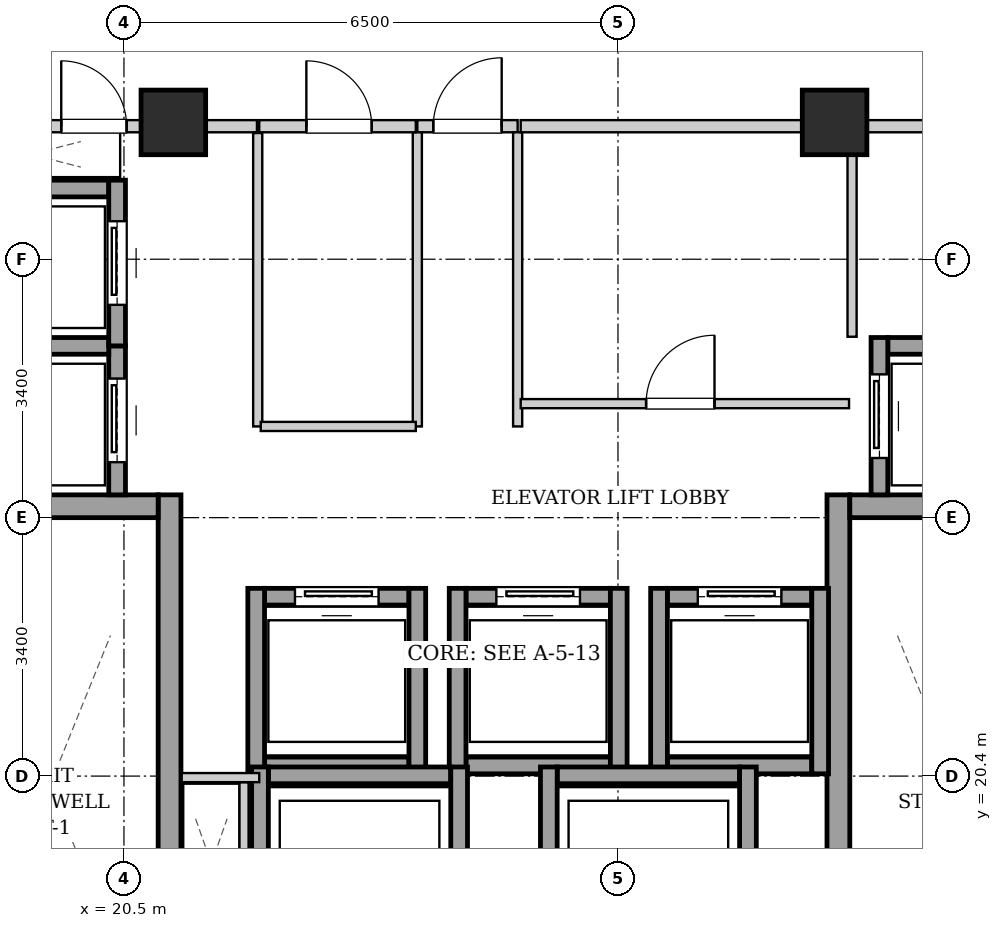
"""IFC4 building model, lengths in metres.
Left out: names, types, materials, properties, quantities, classifications, styles, units other than length and angle.
Written with IfcOpenShell. Run it as: python <this file> out.ifc"""

import sys

from ifc_helpers import new_model, si_unit, direction, frame, frame_2d, origin, origin_2d, place, context, subcontext, project, spatial, rectangle, extrude, element, fill, save


model = new_model("IFC4")
c1 = context("Model", 3, precision=1e-05, world=origin(), true_north=direction((0.0, 1.0)))
c2 = subcontext(c1, "Body", "Model", "MODEL_VIEW")
j1 = project(units=[si_unit("LENGTHUNIT", "METRE"), si_unit("PLANEANGLEUNIT", "RADIAN")], contexts=[c1])
p1 = place(None, origin())
s1 = spatial("IfcSite", under=j1, at=p1, CompositionType="ELEMENT")
p2 = place(p1, origin())
s2 = spatial("IfcBuilding", under=s1, at=p2, CompositionType="ELEMENT")
p3 = place(p2, frame((0.0, 0.0, 174.4)))
s3 = spatial("IfcBuildingStorey", under=s2, at=p3, CompositionType="ELEMENT", Elevation=174.4)
for number, where, z_axis, x_axis in (
    (1, (21.15, 29.0, 0.0), (0.0, 0.0, 1.0), (1.0, 0.0, 0.0)),
    (2, (29.85, 29.0, 0.0), (0.0, 0.0, 1.0), (1.0, 0.0, 0.0)),
):
    element("IfcColumn", number, at=place(p3, frame(where, z_axis=z_axis, x_axis=x_axis)), inside=s3, PredefinedType="COLUMN", context=c2, shape_type="SweptSolid", body=[
        extrude(rectangle(XDim=0.85, YDim=0.85, at=origin_2d()), origin(), (0.0, 0.0, 1.0), 3.3),
    ])
p4 = place(p3, frame((21.1, 15.1, 0.0), z_axis=(0.0, 0.0, 1.0), x_axis=(0.0, 1.0, 0.0)))
e3 = element("IfcWall", 3, at=p4, inside=s3, PredefinedType="SHEAR", context=c2, shape_type="SweptSolid", body=[
    extrude(rectangle(XDim=9.0, YDim=0.3, at=frame_2d((4.5, 0.0))), origin(), (0.0, 0.0, 1.0), 3.04),
])
p5 = place(p3, frame((18.1, 23.95, 0.0), z_axis=(0.0, 0.0, 1.0), x_axis=(1.0, 0.0, 0.0)))
e4 = element("IfcWall", 4, at=p5, inside=s3, PredefinedType="SHEAR", context=c2, shape_type="SweptSolid", body=[
    extrude(rectangle(XDim=2.85, YDim=0.3, at=frame_2d((1.425, 0.0))), origin(), (0.0, 0.0, 1.0), 3.04),
])
p6 = place(p3, frame((29.9, 15.1, 0.0), z_axis=(0.0, 0.0, 1.0), x_axis=(0.0, 1.0, 0.0)))
e5 = element("IfcWall", 5, at=p6, inside=s3, PredefinedType="SHEAR", context=c2, shape_type="SweptSolid", body=[
    extrude(rectangle(XDim=9.0, YDim=0.3, at=frame_2d((4.5, 0.0))), origin(), (0.0, 0.0, 1.0), 3.04),
])
p7 = place(p3, frame((30.05, 23.95, 0.0), z_axis=(0.0, 0.0, 1.0), x_axis=(1.0, 0.0, 0.0)))
e6 = element("IfcWall", 6, at=p7, inside=s3, PredefinedType="SHEAR", context=c2, shape_type="SweptSolid", body=[
    extrude(rectangle(XDim=2.85, YDim=0.3, at=frame_2d((1.425, 0.0))), origin(), (0.0, 0.0, 1.0), 3.04),
])
p8 = place(p3, frame((22.35, 20.54, 0.0), z_axis=(0.0, 0.0, 1.0), x_axis=(1.0, 0.0, 0.0)))
e7 = element("IfcWall", 7, at=p8, inside=s3, PredefinedType="SHEAR", context=c2, shape_type="SweptSolid", body=[
    extrude(rectangle(XDim=1.9, YDim=0.22, at=frame_2d((0.95, 0.0))), origin(), (0.0, 0.0, 1.0), 3.04),
])
p9 = place(p3, frame((22.35, 22.76, 0.0), z_axis=(0.0, 0.0, 1.0), x_axis=(1.0, 0.0, 0.0)))
e8 = element("IfcWall", 8, at=p9, inside=s3, PredefinedType="SHEAR", context=c2, shape_type="SweptSolid", body=[
    extrude(rectangle(XDim=1.9, YDim=0.22, at=frame_2d((0.95, 0.0))), origin(), (0.0, 0.0, 1.0), 3.04),
])
p10 = place(p9, frame((0.4, 0.0, 0.0)))
e9 = element("IfcOpeningElement", 9, at=p10, cuts=e8, PredefinedType="OPENING", context=c2, shape_type="SweptSolid", body=[
    extrude(rectangle(XDim=1.1, YDim=2.15, at=frame_2d((0.55, 1.075))), frame((0.0, 0.12, 0.0), z_axis=(0.0, -1.0, 0.0), x_axis=(1.0, 0.0, 0.0)), (0.0, 0.0, 1.0), 0.24),
])
for number, where, z_axis, x_axis in (
    (10, (22.24, 20.43, 0.0), (0.0, 0.0, 1.0), (0.0, 1.0, 0.0)),
    (11, (24.36, 20.43, 0.0), (0.0, 0.0, 1.0), (0.0, 1.0, 0.0)),
):
    element("IfcWall", number, at=place(p3, frame(where, z_axis=z_axis, x_axis=x_axis)), inside=s3, PredefinedType="SHEAR", context=c2, shape_type="SweptSolid", body=[
        extrude(rectangle(XDim=2.44, YDim=0.22, at=frame_2d((1.22, 0.0))), origin(), (0.0, 0.0, 1.0), 3.04),
    ])
p11 = place(p3, frame((25.0, 20.54, 0.0), z_axis=(0.0, 0.0, 1.0), x_axis=(1.0, 0.0, 0.0)))
e12 = element("IfcWall", 12, at=p11, inside=s3, PredefinedType="SHEAR", context=c2, shape_type="SweptSolid", body=[
    extrude(rectangle(XDim=1.9, YDim=0.22, at=frame_2d((0.95, 0.0))), origin(), (0.0, 0.0, 1.0), 3.04),
])
p12 = place(p3, frame((25.0, 22.76, 0.0), z_axis=(0.0, 0.0, 1.0), x_axis=(1.0, 0.0, 0.0)))
e13 = element("IfcWall", 13, at=p12, inside=s3, PredefinedType="SHEAR", context=c2, shape_type="SweptSolid", body=[
    extrude(rectangle(XDim=1.9, YDim=0.22, at=frame_2d((0.95, 0.0))), origin(), (0.0, 0.0, 1.0), 3.04),
])
p13 = place(p12, frame((0.4, 0.0, 0.0)))
e14 = element("IfcOpeningElement", 14, at=p13, cuts=e13, PredefinedType="OPENING", context=c2, shape_type="SweptSolid", body=[
    extrude(rectangle(XDim=1.1, YDim=2.15, at=frame_2d((0.55, 1.075))), frame((0.0, 0.12, 0.0), z_axis=(0.0, -1.0, 0.0), x_axis=(1.0, 0.0, 0.0)), (0.0, 0.0, 1.0), 0.24),
])
for number, where, z_axis, x_axis in (
    (15, (24.89, 20.43, 0.0), (0.0, 0.0, 1.0), (0.0, 1.0, 0.0)),
    (16, (27.01, 20.43, 0.0), (0.0, 0.0, 1.0), (0.0, 1.0, 0.0)),
):
    element("IfcWall", number, at=place(p3, frame(where, z_axis=z_axis, x_axis=x_axis)), inside=s3, PredefinedType="SHEAR", context=c2, shape_type="SweptSolid", body=[
        extrude(rectangle(XDim=2.44, YDim=0.22, at=frame_2d((1.22, 0.0))), origin(), (0.0, 0.0, 1.0), 3.04),
    ])
p14 = place(p3, frame((27.65, 20.54, 0.0), z_axis=(0.0, 0.0, 1.0), x_axis=(1.0, 0.0, 0.0)))
e17 = element("IfcWall", 17, at=p14, inside=s3, PredefinedType="SHEAR", context=c2, shape_type="SweptSolid", body=[
    extrude(rectangle(XDim=1.9, YDim=0.22, at=frame_2d((0.95, 0.0))), origin(), (0.0, 0.0, 1.0), 3.04),
])
p15 = place(p3, frame((27.65, 22.76, 0.0), z_axis=(0.0, 0.0, 1.0), x_axis=(1.0, 0.0, 0.0)))
e18 = element("IfcWall", 18, at=p15, inside=s3, PredefinedType="SHEAR", context=c2, shape_type="SweptSolid", body=[
    extrude(rectangle(XDim=1.9, YDim=0.22, at=frame_2d((0.95, 0.0))), origin(), (0.0, 0.0, 1.0), 3.04),
])
p16 = place(p15, frame((0.4, 0.0, 0.0)))
e19 = element("IfcOpeningElement", 19, at=p16, cuts=e18, PredefinedType="OPENING", context=c2, shape_type="SweptSolid", body=[
    extrude(rectangle(XDim=1.1, YDim=2.15, at=frame_2d((0.55, 1.075))), frame((0.0, 0.12, 0.0), z_axis=(0.0, -1.0, 0.0), x_axis=(1.0, 0.0, 0.0)), (0.0, 0.0, 1.0), 0.24),
])
for number, where, z_axis, x_axis in (
    (20, (27.54, 20.43, 0.0), (0.0, 0.0, 1.0), (0.0, 1.0, 0.0)),
    (21, (29.66, 20.43, 0.0), (0.0, 0.0, 1.0), (0.0, 1.0, 0.0)),
):
    element("IfcWall", number, at=place(p3, frame(where, z_axis=z_axis, x_axis=x_axis)), inside=s3, PredefinedType="SHEAR", context=c2, shape_type="SweptSolid", body=[
        extrude(rectangle(XDim=2.44, YDim=0.22, at=frame_2d((1.22, 0.0))), origin(), (0.0, 0.0, 1.0), 3.04),
    ])
p17 = place(p3, frame((20.41, 24.1, 0.0), z_axis=(0.0, 0.0, 1.0), x_axis=(0.0, 1.0, 0.0)))
e22 = element("IfcWall", 22, at=p17, inside=s3, PredefinedType="SHEAR", context=c2, shape_type="SweptSolid", body=[
    extrude(rectangle(XDim=1.96, YDim=0.22, at=frame_2d((0.98, 0.0))), origin(), (0.0, 0.0, 1.0), 3.04),
])
p18 = place(p17, frame((0.43, 0.0, 0.0)))
e23 = element("IfcOpeningElement", 23, at=p18, cuts=e22, PredefinedType="OPENING", context=c2, shape_type="SweptSolid", body=[
    extrude(rectangle(XDim=1.1, YDim=2.15, at=frame_2d((0.55, 1.075))), frame((0.0, 0.12, 0.0), z_axis=(0.0, -1.0, 0.0), x_axis=(1.0, 0.0, 0.0)), (0.0, 0.0, 1.0), 0.24),
])
for number, where, z_axis, x_axis in (
    (24, (18.4, 26.06, 0.0), (0.0, 0.0, 1.0), (1.0, 0.0, 0.0)),
    (25, (18.4, 28.13, 0.0), (0.0, 0.0, 1.0), (1.0, 0.0, 0.0)),
):
    element("IfcWall", number, at=place(p3, frame(where, z_axis=z_axis, x_axis=x_axis)), inside=s3, PredefinedType="SHEAR", context=c2, shape_type="SweptSolid", body=[
        extrude(rectangle(XDim=1.9, YDim=0.22, at=frame_2d((0.95, 0.0))), origin(), (0.0, 0.0, 1.0), 3.04),
    ])
p19 = place(p3, frame((20.41, 26.06, 0.0), z_axis=(0.0, 0.0, 1.0), x_axis=(0.0, 1.0, 0.0)))
e26 = element("IfcWall", 26, at=p19, inside=s3, PredefinedType="SHEAR", context=c2, shape_type="SweptSolid", body=[
    extrude(rectangle(XDim=2.18, YDim=0.22, at=frame_2d((1.09, 0.0))), origin(), (0.0, 0.0, 1.0), 3.04),
])
p20 = place(p19, frame((0.54, 0.0, 0.0)))
e27 = element("IfcOpeningElement", 27, at=p20, cuts=e26, PredefinedType="OPENING", context=c2, shape_type="SweptSolid", body=[
    extrude(rectangle(XDim=1.1, YDim=2.15, at=frame_2d((0.55, 1.075))), frame((0.0, 0.12, 0.0), z_axis=(0.0, -1.0, 0.0), x_axis=(1.0, 0.0, 0.0)), (0.0, 0.0, 1.0), 0.24),
])
p21 = place(p3, frame((30.55, 26.06, 0.0), z_axis=(0.0, 0.0, 1.0), x_axis=(1.0, 0.0, 0.0)))
e28 = element("IfcWall", 28, at=p21, inside=s3, PredefinedType="SHEAR", context=c2, shape_type="SweptSolid", body=[
    extrude(rectangle(XDim=1.9, YDim=0.22, at=frame_2d((0.95, 0.0))), origin(), (0.0, 0.0, 1.0), 3.04),
])
p22 = place(p3, frame((30.44, 24.1, 0.0), z_axis=(0.0, 0.0, 1.0), x_axis=(0.0, 1.0, 0.0)))
e29 = element("IfcWall", 29, at=p22, inside=s3, PredefinedType="SHEAR", context=c2, shape_type="SweptSolid", body=[
    extrude(rectangle(XDim=2.07, YDim=0.22, at=frame_2d((1.035, 0.0))), origin(), (0.0, 0.0, 1.0), 3.04),
])
p23 = place(p22, frame((0.485, 0.0, 0.0)))
e30 = element("IfcOpeningElement", 30, at=p23, cuts=e29, PredefinedType="OPENING", context=c2, shape_type="SweptSolid", body=[
    extrude(rectangle(XDim=1.1, YDim=2.15, at=frame_2d((0.55, 1.075))), frame((0.0, 0.12, 0.0), z_axis=(0.0, -1.0, 0.0), x_axis=(1.0, 0.0, 0.0)), (0.0, 0.0, 1.0), 0.24),
])
p24 = place(p3, frame((22.4, 20.41, 0.0), z_axis=(0.0, 0.0, 1.0), x_axis=(1.0, 0.0, 0.0)))
e31 = element("IfcWall", 31, at=p24, inside=s3, PredefinedType="SHEAR", context=c2, shape_type="SweptSolid", body=[
    extrude(rectangle(XDim=2.4, YDim=0.22, at=frame_2d((1.2, 0.0))), origin(), (0.0, 0.0, 1.0), 3.04),
])
for number, where, z_axis, x_axis in (
    (32, (22.29, 17.98, 0.0), (0.0, 0.0, 1.0), (0.0, 1.0, 0.0)),
    (33, (24.91, 17.98, 0.0), (0.0, 0.0, 1.0), (0.0, 1.0, 0.0)),
):
    element("IfcWall", number, at=place(p3, frame(where, z_axis=z_axis, x_axis=x_axis)), inside=s3, PredefinedType="SHEAR", context=c2, shape_type="SweptSolid", body=[
        extrude(rectangle(XDim=2.54, YDim=0.22, at=frame_2d((1.27, 0.0))), origin(), (0.0, 0.0, 1.0), 3.04),
    ])
p25 = place(p3, frame((26.2, 20.41, 0.0), z_axis=(0.0, 0.0, 1.0), x_axis=(1.0, 0.0, 0.0)))
e34 = element("IfcWall", 34, at=p25, inside=s3, PredefinedType="SHEAR", context=c2, shape_type="SweptSolid", body=[
    extrude(rectangle(XDim=2.4, YDim=0.22, at=frame_2d((1.2, 0.0))), origin(), (0.0, 0.0, 1.0), 3.04),
])
for number, where, z_axis, x_axis in (
    (35, (26.09, 17.98, 0.0), (0.0, 0.0, 1.0), (0.0, 1.0, 0.0)),
    (36, (28.71, 17.98, 0.0), (0.0, 0.0, 1.0), (0.0, 1.0, 0.0)),
):
    element("IfcWall", number, at=place(p3, frame(where, z_axis=z_axis, x_axis=x_axis)), inside=s3, PredefinedType="SHEAR", context=c2, shape_type="SweptSolid", body=[
        extrude(rectangle(XDim=2.54, YDim=0.22, at=frame_2d((1.27, 0.0))), origin(), (0.0, 0.0, 1.0), 3.04),
    ])
p26 = place(p3, frame((24.36, 28.95, 0.0), z_axis=(0.0, 0.0, 1.0), x_axis=(1.0, 0.0, 0.0)))
e37 = element("IfcWall", 37, at=p26, inside=s3, PredefinedType="PARTITIONING", context=c2, shape_type="SweptSolid", body=[
    extrude(rectangle(XDim=1.32, YDim=0.16, at=frame_2d((0.66, 0.0))), origin(), (0.0, 0.0, 1.0), 2.556),
])
p27 = place(p26, frame((0.21, 0.0, 0.0)))
e38 = element("IfcOpeningElement", 38, at=p27, cuts=e37, PredefinedType="OPENING", context=c2, shape_type="SweptSolid", body=[
    extrude(rectangle(XDim=0.9, YDim=2.05, at=frame_2d((0.45, 1.025))), frame((0.0, 0.09, 0.0), z_axis=(0.0, -1.0, 0.0), x_axis=(1.0, 0.0, 0.0)), (0.0, 0.0, 1.0), 0.18),
])
p28 = place(p3, frame((17.96, 28.95, 0.0), z_axis=(0.0, 0.0, 1.0), x_axis=(1.0, 0.0, 0.0)))
e39 = element("IfcWall", 39, at=p28, inside=s3, PredefinedType="PARTITIONING", context=c2, shape_type="SweptSolid", body=[
    extrude(rectangle(XDim=4.29, YDim=0.16, at=frame_2d((2.145, 0.0))), origin(), (0.0, 0.0, 1.0), 2.556),
])
p29 = place(p28, frame((1.715, 0.0, 0.0)))
e40 = element("IfcOpeningElement", 40, at=p29, cuts=e39, PredefinedType="OPENING", context=c2, shape_type="SweptSolid", body=[
    extrude(rectangle(XDim=0.86, YDim=2.05, at=frame_2d((0.43, 1.025))), frame((0.0, 0.09, 0.0), z_axis=(0.0, -1.0, 0.0), x_axis=(1.0, 0.0, 0.0)), (0.0, 0.0, 1.0), 0.18),
])
p30 = place(p3, frame((22.08, 18.2, 0.0), z_axis=(0.0, 0.0, 1.0), x_axis=(0.0, 1.0, 0.0)))
e41 = element("IfcWall", 41, at=p30, inside=s3, PredefinedType="PARTITIONING", context=c2, shape_type="SweptSolid", body=[
    extrude(rectangle(XDim=2.12, YDim=0.12, at=frame_2d((1.06, 0.0))), origin(), (0.0, 0.0, 1.0), 3.04),
])
p31 = place(p3, frame((22.28, 20.38, 0.0), z_axis=(0.0, 0.0, 1.0), x_axis=(-1.0, 0.0, 0.0)))
e42 = element("IfcWall", 42, at=p31, inside=s3, PredefinedType="PARTITIONING", context=c2, shape_type="SweptSolid", body=[
    extrude(rectangle(XDim=1.02, YDim=0.12, at=frame_2d((0.51, 0.0))), origin(), (0.0, 0.0, 1.0), 3.04),
])
for number, where, z_axis, x_axis in (
    (43, (24.36, 25.0, 0.0), (0.0, 0.0, 1.0), (0.0, 1.0, 0.0)),
    (44, (25.68, 25.0, 0.0), (0.0, 0.0, 1.0), (0.0, 1.0, 0.0)),
):
    element("IfcWall", number, at=place(p3, frame(where, z_axis=z_axis, x_axis=x_axis)), inside=s3, PredefinedType="PARTITIONING", context=c2, shape_type="SweptSolid", body=[
        extrude(rectangle(XDim=3.87, YDim=0.12, at=frame_2d((1.935, 0.0))), origin(), (0.0, 0.0, 1.0), 3.04),
    ])
p32 = place(p3, frame((30.08, 26.18, 0.0), z_axis=(0.0, 0.0, 1.0), x_axis=(0.0, 1.0, 0.0)))
e45 = element("IfcWall", 45, at=p32, inside=s3, PredefinedType="PARTITIONING", context=c2, shape_type="SweptSolid", body=[
    extrude(rectangle(XDim=2.68, YDim=0.12, at=frame_2d((1.34, 0.0))), origin(), (0.0, 0.0, 1.0), 3.04),
])
p33 = place(p3, frame((30.08, 28.95, 0.0), z_axis=(0.0, 0.0, 1.0), x_axis=(1.0, 0.0, 0.0)))
e46 = element("IfcWall", 46, at=p33, inside=s3, PredefinedType="PARTITIONING", context=c2, shape_type="SweptSolid", body=[
    extrude(rectangle(XDim=2.96, YDim=0.16, at=frame_2d((1.48, 0.0))), origin(), (0.0, 0.0, 1.0), 3.04),
])
p34 = place(p33, frame((1.045, 0.0, 0.0)))
e47 = element("IfcOpeningElement", 47, at=p34, cuts=e46, PredefinedType="OPENING", context=c2, shape_type="SweptSolid", body=[
    extrude(rectangle(XDim=0.86, YDim=2.05, at=frame_2d((0.43, 1.025))), frame((0.0, 0.09, 0.0), z_axis=(0.0, -1.0, 0.0), x_axis=(1.0, 0.0, 0.0)), (0.0, 0.0, 1.0), 0.18),
])
p35 = place(p3, frame((22.26, 25.0, 0.0), z_axis=(0.0, 0.0, 1.0), x_axis=(0.0, 1.0, 0.0)))
e48 = element("IfcWall", 48, at=p35, inside=s3, PredefinedType="PARTITIONING", context=c2, shape_type="SweptSolid", body=[
    extrude(rectangle(XDim=3.86, YDim=0.12, at=frame_2d((1.93, 0.0))), origin(), (0.0, 0.0, 1.0), 3.04),
])
p36 = place(p3, frame((22.3, 25.0, 0.0), z_axis=(0.0, 0.0, 1.0), x_axis=(1.0, 0.0, 0.0)))
e49 = element("IfcWall", 49, at=p36, inside=s3, PredefinedType="PARTITIONING", context=c2, shape_type="SweptSolid", body=[
    extrude(rectangle(XDim=2.04, YDim=0.12, at=frame_2d((1.02, 0.0))), origin(), (0.0, 0.0, 1.0), 3.04),
])
p37 = place(p3, frame((22.28, 28.95, 0.0), z_axis=(0.0, 0.0, 1.0), x_axis=(1.0, 0.0, 0.0)))
e50 = element("IfcWall", 50, at=p37, inside=s3, PredefinedType="PARTITIONING", context=c2, shape_type="SweptSolid", body=[
    extrude(rectangle(XDim=2.06, YDim=0.16, at=frame_2d((1.03, 0.0))), origin(), (0.0, 0.0, 1.0), 2.556),
])
p38 = place(p37, frame((0.62, 0.0, 0.0)))
e51 = element("IfcOpeningElement", 51, at=p38, cuts=e50, PredefinedType="OPENING", context=c2, shape_type="SweptSolid", body=[
    extrude(rectangle(XDim=0.86, YDim=2.05, at=frame_2d((0.43, 1.025))), frame((0.0, 0.09, 0.0), z_axis=(0.0, -1.0, 0.0), x_axis=(1.0, 0.0, 0.0)), (0.0, 0.0, 1.0), 0.18),
])
p39 = place(p3, frame((25.72, 28.95, 0.0), z_axis=(0.0, 0.0, 1.0), x_axis=(1.0, 0.0, 0.0)))
e52 = element("IfcWall", 52, at=p39, inside=s3, PredefinedType="PARTITIONING", context=c2, shape_type="SweptSolid", body=[
    extrude(rectangle(XDim=4.32, YDim=0.16, at=frame_2d((2.16, 0.0))), origin(), (0.0, 0.0, 1.0), 2.556),
])
p40 = place(p3, frame((25.72, 25.3, 0.0), z_axis=(0.0, 0.0, 1.0), x_axis=(1.0, 0.0, 0.0)))
e53 = element("IfcWall", 53, at=p40, inside=s3, PredefinedType="PARTITIONING", context=c2, shape_type="SweptSolid", body=[
    extrude(rectangle(XDim=4.32, YDim=0.12, at=frame_2d((2.16, 0.0))), origin(), (0.0, 0.0, 1.0), 3.04),
])
p41 = place(p40, frame((1.65, 0.0, 0.0)))
e54 = element("IfcOpeningElement", 54, at=p41, cuts=e53, PredefinedType="OPENING", context=c2, shape_type="SweptSolid", body=[
    extrude(rectangle(XDim=0.9, YDim=2.05, at=frame_2d((0.45, 1.025))), frame((0.0, 0.07, 0.0), z_axis=(0.0, -1.0, 0.0), x_axis=(1.0, 0.0, 0.0)), (0.0, 0.0, 1.0), 0.14),
])
p42 = place(p10, origin())
e55 = element("IfcDoor", 55, at=p42, inside=s3, OperationType="SLIDING_TO_LEFT", PredefinedType="DOOR", context=c2, shape_type="SweptSolid", body=[
    extrude(rectangle(XDim=1.1, YDim=2.15, at=frame_2d((0.55, 1.075))), frame((0.0, 0.025, 0.0), z_axis=(0.0, -1.0, 0.0), x_axis=(1.0, 0.0, 0.0)), (0.0, 0.0, 1.0), 0.05),
])
fill(e9, e55)
p43 = place(p13, origin())
e56 = element("IfcDoor", 56, at=p43, inside=s3, OperationType="SLIDING_TO_LEFT", PredefinedType="DOOR", context=c2, shape_type="SweptSolid", body=[
    extrude(rectangle(XDim=1.1, YDim=2.15, at=frame_2d((0.55, 1.075))), frame((0.0, 0.025, 0.0), z_axis=(0.0, -1.0, 0.0), x_axis=(1.0, 0.0, 0.0)), (0.0, 0.0, 1.0), 0.05),
])
fill(e14, e56)
p44 = place(p16, origin())
e57 = element("IfcDoor", 57, at=p44, inside=s3, OperationType="SLIDING_TO_LEFT", PredefinedType="DOOR", context=c2, shape_type="SweptSolid", body=[
    extrude(rectangle(XDim=1.1, YDim=2.15, at=frame_2d((0.55, 1.075))), frame((0.0, 0.025, 0.0), z_axis=(0.0, -1.0, 0.0), x_axis=(1.0, 0.0, 0.0)), (0.0, 0.0, 1.0), 0.05),
])
fill(e19, e57)
p45 = place(p18, origin())
e58 = element("IfcDoor", 58, at=p45, inside=s3, OperationType="SLIDING_TO_LEFT", PredefinedType="DOOR", context=c2, shape_type="SweptSolid", body=[
    extrude(rectangle(XDim=1.1, YDim=2.15, at=frame_2d((0.55, 1.075))), frame((0.0, 0.025, 0.0), z_axis=(0.0, -1.0, 0.0), x_axis=(1.0, 0.0, 0.0)), (0.0, 0.0, 1.0), 0.05),
])
fill(e23, e58)
p46 = place(p20, origin())
e59 = element("IfcDoor", 59, at=p46, inside=s3, OperationType="SLIDING_TO_LEFT", PredefinedType="DOOR", context=c2, shape_type="SweptSolid", body=[
    extrude(rectangle(XDim=1.1, YDim=2.15, at=frame_2d((0.55, 1.075))), frame((0.0, 0.025, 0.0), z_axis=(0.0, -1.0, 0.0), x_axis=(1.0, 0.0, 0.0)), (0.0, 0.0, 1.0), 0.05),
])
fill(e27, e59)
p47 = place(p23, origin())
e60 = element("IfcDoor", 60, at=p47, inside=s3, OperationType="SLIDING_TO_LEFT", PredefinedType="DOOR", context=c2, shape_type="SweptSolid", body=[
    extrude(rectangle(XDim=1.1, YDim=2.15, at=frame_2d((0.55, 1.075))), frame((0.0, 0.025, 0.0), z_axis=(0.0, -1.0, 0.0), x_axis=(1.0, 0.0, 0.0)), (0.0, 0.0, 1.0), 0.05),
])
fill(e30, e60)
p48 = place(p27, origin())
e61 = element("IfcDoor", 61, at=p48, inside=s3, OperationType="SINGLE_SWING_RIGHT", PredefinedType="DOOR", context=c2, shape_type="SweptSolid", body=[
    extrude(rectangle(XDim=0.9, YDim=2.05, at=frame_2d((0.45, 1.025))), frame((0.0, 0.025, 0.0), z_axis=(0.0, -1.0, 0.0), x_axis=(1.0, 0.0, 0.0)), (0.0, 0.0, 1.0), 0.05),
])
fill(e38, e61)
p49 = place(p29, origin())
e62 = element("IfcDoor", 62, at=p49, inside=s3, OperationType="SINGLE_SWING_LEFT", PredefinedType="DOOR", context=c2, shape_type="SweptSolid", body=[
    extrude(rectangle(XDim=0.86, YDim=2.05, at=frame_2d((0.43, 1.025))), frame((0.0, 0.025, 0.0), z_axis=(0.0, -1.0, 0.0), x_axis=(1.0, 0.0, 0.0)), (0.0, 0.0, 1.0), 0.05),
])
fill(e40, e62)
p50 = place(p38, origin())
e63 = element("IfcDoor", 63, at=p50, inside=s3, OperationType="SINGLE_SWING_LEFT", PredefinedType="DOOR", context=c2, shape_type="SweptSolid", body=[
    extrude(rectangle(XDim=0.86, YDim=2.05, at=frame_2d((0.43, 1.025))), frame((0.0, 0.025, 0.0), z_axis=(0.0, -1.0, 0.0), x_axis=(1.0, 0.0, 0.0)), (0.0, 0.0, 1.0), 0.05),
])
fill(e51, e63)
p51 = place(p41, origin())
e64 = element("IfcDoor", 64, at=p51, inside=s3, OperationType="SINGLE_SWING_RIGHT", PredefinedType="DOOR", context=c2, shape_type="SweptSolid", body=[
    extrude(rectangle(XDim=0.9, YDim=2.05, at=frame_2d((0.45, 1.025))), frame((0.0, 0.025, 0.0), z_axis=(0.0, -1.0, 0.0), x_axis=(1.0, 0.0, 0.0)), (0.0, 0.0, 1.0), 0.05),
])
fill(e54, e64)
save(model, sys.argv[1])
